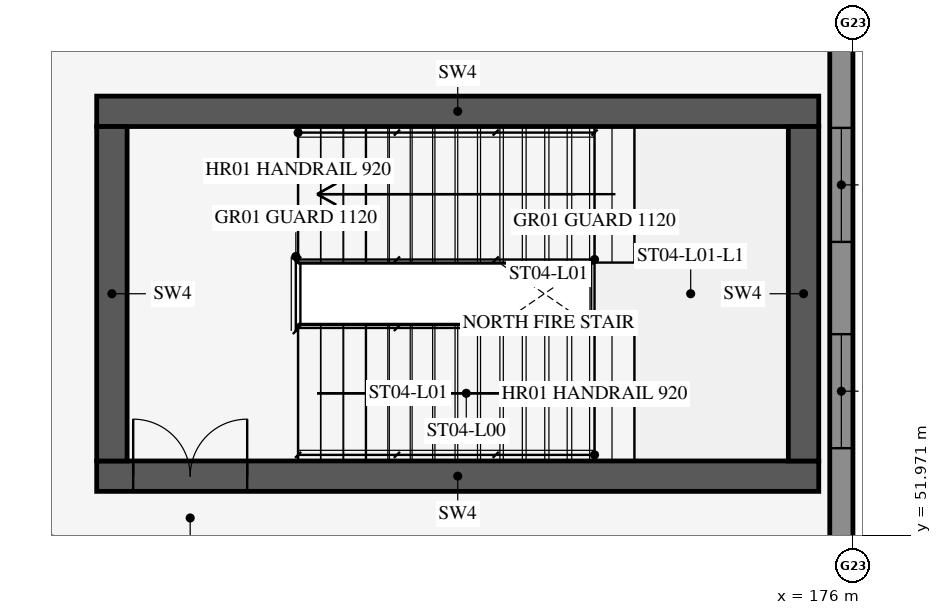
"""IFC4 building model, lengths in metres.
Left out: names, types, materials, properties, quantities, classifications, styles, units other than length and angle.
Written with IfcOpenShell. Run it as: python <this file> out.ifc"""

import sys

from ifc_helpers import new_model, si_unit, direction, frame, frame_2d, origin, place, context, subcontext, project, spatial, rectangle, extrude, element, fill, save


model = new_model("IFC4")
c1 = context("Model", 3, precision=1e-05, world=origin(), true_north=direction((0.0, 1.0)))
c2 = subcontext(c1, "Body", "Model", "MODEL_VIEW")
j1 = project(units=[si_unit("LENGTHUNIT", "METRE"), si_unit("PLANEANGLEUNIT", "RADIAN")], contexts=[c1])
p1 = place(None, origin())
s1 = spatial("IfcSite", under=j1, at=p1, CompositionType="ELEMENT")
p2 = place(p1, origin())
s2 = spatial("IfcBuilding", under=s1, at=p2, CompositionType="ELEMENT")
p3 = place(p2, frame((0.0, 0.0, 5.4)))
s3 = spatial("IfcBuildingStorey", under=s2, at=p3, CompositionType="ELEMENT", Elevation=5.4)
p4 = place(p3, frame((166.05, 52.75, 0.0), z_axis=(0.0, 0.0, 1.0), x_axis=(1.0, 0.0, 0.0)))
e1 = element("IfcWall", 1, at=p4, inside=s3, PredefinedType="SHEAR", context=c2, shape_type="SweptSolid", body=[
    extrude(rectangle(XDim=9.5, YDim=0.4, at=frame_2d((4.75, 0.0))), origin(), (0.0, 0.0, 1.0), 4.56),
])
p5 = place(p4, frame((0.48, 0.0, 0.0)))
e2 = element("IfcOpeningElement", 2, at=p5, cuts=e1, PredefinedType="OPENING", context=c2, shape_type="SweptSolid", body=[
    extrude(rectangle(XDim=1.5, YDim=2.3, at=frame_2d((0.75, 1.15))), frame((0.0, 0.212, 0.0), z_axis=(0.0, -1.0, 0.0), x_axis=(1.0, 0.0, 0.0)), (0.0, 0.0, 1.0), 0.424),
])
p6 = place(p3, frame((166.05, 57.55, 0.0), z_axis=(0.0, 0.0, 1.0), x_axis=(1.0, 0.0, 0.0)))
e3 = element("IfcWall", 3, at=p6, inside=s3, PredefinedType="SHEAR", context=c2, shape_type="SweptSolid", body=[
    extrude(rectangle(XDim=9.5, YDim=0.4, at=frame_2d((4.75, 0.0))), origin(), (0.0, 0.0, 1.0), 4.56),
])
for number, where, z_axis, x_axis in (
    (4, (166.25, 52.95, 0.0), (0.0, 0.0, 1.0), (0.0, 1.0, 0.0)),
    (5, (175.35, 52.95, 0.0), (0.0, 0.0, 1.0), (0.0, 1.0, 0.0)),
):
    element("IfcWall", number, at=place(p3, frame(where, z_axis=z_axis, x_axis=x_axis)), inside=s3, PredefinedType="SHEAR", context=c2, shape_type="SweptSolid", body=[
        extrude(rectangle(XDim=4.4, YDim=0.4, at=frame_2d((2.2, 0.0))), origin(), (0.0, 0.0, 1.0), 4.56),
    ])
p7 = place(p3, frame((175.847, 51.904, 0.0), z_axis=(0.0, 0.0, 1.0), x_axis=(0.0, 1.0, 0.0)))
e6 = element("IfcWall", 6, at=p7, inside=s3, PredefinedType="SOLIDWALL", context=c2, shape_type="SweptSolid", body=[
    extrude(rectangle(XDim=6.642, YDim=0.305, at=frame_2d((3.321, 0.0))), origin(), (0.0, 0.0, 1.0), 4.117),
])
p8 = place(p7, frame((1.214, 0.0, 0.95)))
e7 = element("IfcOpeningElement", 7, at=p8, cuts=e6, PredefinedType="OPENING", context=c2, shape_type="SweptSolid", body=[
    extrude(rectangle(XDim=1.5, YDim=1.2, at=frame_2d((0.75, 0.6))), frame((0.0, 0.165, 0.0), z_axis=(0.0, -1.0, 0.0), x_axis=(1.0, 0.0, 0.0)), (0.0, 0.0, 1.0), 0.329),
])
p9 = place(p7, frame((3.928, 0.0, 0.95)))
e8 = element("IfcOpeningElement", 8, at=p9, cuts=e6, PredefinedType="OPENING", context=c2, shape_type="SweptSolid", body=[
    extrude(rectangle(XDim=1.5, YDim=1.2, at=frame_2d((0.75, 0.6))), frame((0.0, 0.165, 0.0), z_axis=(0.0, -1.0, 0.0), x_axis=(1.0, 0.0, 0.0)), (0.0, 0.0, 1.0), 0.329),
])
p10 = place(p5, origin())
e9 = element("IfcDoor", 9, at=p10, inside=s3, OperationType="DOUBLE_DOOR_SINGLE_SWING", PredefinedType="DOOR", context=c2, shape_type="SweptSolid", body=[
    extrude(rectangle(XDim=1.5, YDim=2.3, at=frame_2d((0.75, 1.15))), frame((0.0, 0.025, 0.0), z_axis=(0.0, -1.0, 0.0), x_axis=(1.0, 0.0, 0.0)), (0.0, 0.0, 1.0), 0.05),
])
fill(e2, e9)
p11 = place(p8, origin())
e10 = element("IfcWindow", 10, at=p11, inside=s3, PartitioningType="SINGLE_PANEL", PredefinedType="WINDOW", context=c2, shape_type="SweptSolid", body=[
    extrude(rectangle(XDim=1.5, YDim=1.2, at=frame_2d((0.75, 0.6))), frame((0.0, 0.03, 0.0), z_axis=(0.0, -1.0, 0.0), x_axis=(1.0, 0.0, 0.0)), (0.0, 0.0, 1.0), 0.06),
])
fill(e7, e10)
p12 = place(p9, origin())
e11 = element("IfcWindow", 11, at=p12, inside=s3, PartitioningType="SINGLE_PANEL", PredefinedType="WINDOW", context=c2, shape_type="SweptSolid", body=[
    extrude(rectangle(XDim=1.5, YDim=1.2, at=frame_2d((0.75, 0.6))), frame((0.0, 0.03, 0.0), z_axis=(0.0, -1.0, 0.0), x_axis=(1.0, 0.0, 0.0)), (0.0, 0.0, 1.0), 0.06),
])
fill(e8, e11)
save(model, sys.argv[1])
